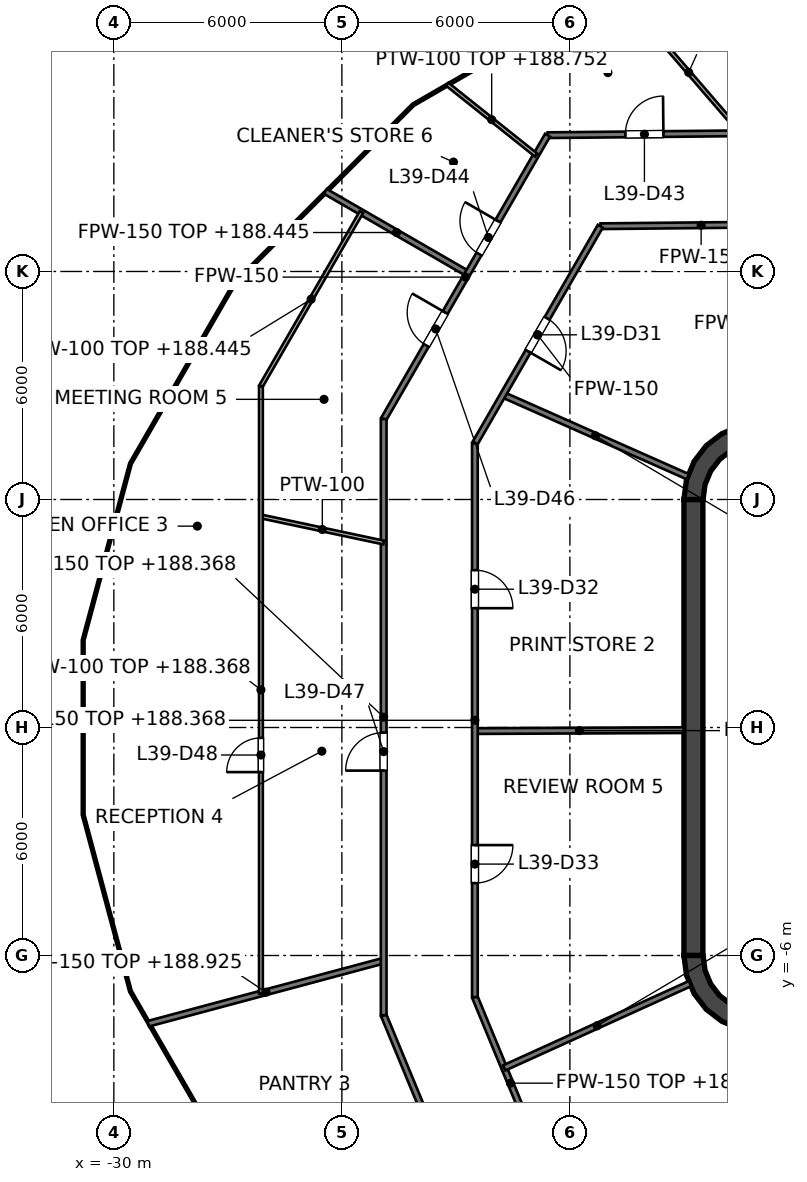
"""IFC4 building model, lengths in metres.
Left out: names, types, materials, properties, quantities, classifications, styles, units other than length and angle.
Written with IfcOpenShell. Run it as: python <this file> out.ifc"""

import sys

from ifc_helpers import new_model, si_unit, direction, frame, frame_2d, origin, place, context, subcontext, project, spatial, polyline, rectangle, outline, extrude, element, fill, save


model = new_model("IFC4")
c1 = context("Model", 3, precision=1e-05, world=origin(), true_north=direction((0.0, 1.0)))
c2 = subcontext(c1, "Body", "Model", "MODEL_VIEW")
j1 = project(units=[si_unit("LENGTHUNIT", "METRE"), si_unit("PLANEANGLEUNIT", "RADIAN")], contexts=[c1])
p1 = place(None, origin())
s1 = spatial("IfcSite", under=j1, at=p1, CompositionType="ELEMENT")
p2 = place(p1, origin())
s2 = spatial("IfcBuilding", under=s1, at=p2, CompositionType="ELEMENT")
p3 = place(p2, frame((0.0, 0.0, 185.6)))
s3 = spatial("IfcBuildingStorey", under=s2, at=p3, CompositionType="ELEMENT", Elevation=185.6)
p4 = place(p3, frame((-14.75, -6.0, 0.0), z_axis=(0.0, 0.0, 1.0), x_axis=(0.0, 1.0, 0.0)))
e1 = element("IfcWall", 1, at=p4, inside=s3, PredefinedType="SHEAR", context=c2, shape_type="SweptSolid", body=[
    extrude(rectangle(XDim=12.0, YDim=0.5, at=frame_2d((6.0, 0.0))), origin(), (0.0, 0.0, 1.0), 4.0),
])
p5 = place(p3, origin())
e2 = element("IfcWall", 2, at=p5, inside=s3, PredefinedType="SHEAR", context=c2, shape_type="SweptSolid", body=[
    extrude(outline(polyline([(-15.0, 6.0), (-14.496, 6.0), (-14.445, 6.387), (-14.295, 6.748), (-14.058, 7.058), (-13.748, 7.295), (-13.387, 7.445), (-13.0, 7.496), (-13.0, 8.0), (-13.518, 7.932), (-14.0, 7.732), (-14.414, 7.414), (-14.732, 7.0), (-14.932, 6.518), (-15.0, 6.0)])), origin(), (0.0, 0.0, 1.0), 4.0),
])
e3 = element("IfcWall", 3, at=p5, inside=s3, PredefinedType="SHEAR", context=c2, shape_type="SweptSolid", body=[
    extrude(outline(polyline([(-13.0, -8.0), (-13.0, -7.496), (-13.387, -7.445), (-13.748, -7.295), (-14.058, -7.058), (-14.295, -6.748), (-14.445, -6.387), (-14.496, -6.0), (-15.0, -6.0), (-14.932, -6.518), (-14.732, -7.0), (-14.414, -7.414), (-14.0, -7.732), (-13.518, -7.932), (-13.0, -8.0)])), origin(), (0.0, 0.0, 1.0), 4.0),
])
e4 = element("IfcWall", 4, at=p5, inside=s3, PredefinedType="SOLIDWALL", context=c2, shape_type="SweptSolid", body=[
    extrude(outline(polyline([(-12.0, -5.925), (-12.0, -5.675), (-14.25, -5.675), (-14.25, -3.025), (-12.0, -3.025), (-12.0, -2.775), (-14.25, -2.775), (-14.25, -0.125), (-12.0, -0.125), (-12.0, 0.125), (-14.25, 0.125), (-14.25, 2.775), (-12.0, 2.775), (-12.0, 3.025), (-14.25, 3.025), (-14.25, 5.675), (-12.0, 5.675), (-12.0, 5.925), (-14.25, 5.925), (-14.5, 5.925), (-14.5, 5.675), (-14.5, 3.025), (-14.5, 2.775), (-14.5, 0.125), (-14.5, -0.125), (-14.5, -2.775), (-14.5, -3.025), (-14.5, -5.675), (-14.5, -5.925), (-14.25, -5.925), (-12.0, -5.925)])), origin(), (0.0, 0.0, 1.0), 3.85),
])
p6 = place(p3, frame((-22.9, -7.572, 0.0), z_axis=(0.0, 0.0, 1.0), x_axis=(0.382367581622, -0.924010298928, 0.0)))
e5 = element("IfcWall", 5, at=p6, inside=s3, PredefinedType="PARTITIONING", context=c2, shape_type="SweptSolid", body=[
    extrude(rectangle(XDim=6.374, YDim=0.15, at=frame_2d((3.187, 0.0))), origin(), (0.0, 0.0, 1.0), 2.777),
])
p7 = place(p6, frame((2.6, 0.0, 0.0)))
e6 = element("IfcOpeningElement", 6, at=p7, cuts=e5, PredefinedType="OPENING", context=c2, shape_type="SweptSolid", body=[
    extrude(rectangle(XDim=1.0, YDim=2.1, at=frame_2d((0.5, 1.05))), frame((0.0, 0.075, 0.0), z_axis=(0.0, -1.0, 0.0), x_axis=(1.0, 0.0, 0.0)), (0.0, 0.0, 1.0), 0.15),
])
p8 = place(p3, frame((-20.5, -7.095, 0.0), z_axis=(0.0, 0.0, 1.0), x_axis=(0.382364990163, -0.924011371303, 0.0)))
e7 = element("IfcWall", 7, at=p8, inside=s3, PredefinedType="PARTITIONING", context=c2, shape_type="SweptSolid", body=[
    extrude(rectangle(XDim=4.902, YDim=0.15, at=frame_2d((2.451, 0.0))), origin(), (0.0, 0.0, 1.0), 2.845),
])
p9 = place(p3, frame((-24.433, 14.106, 0.0), z_axis=(0.0, 0.0, 1.0), x_axis=(0.866048255864, -0.499960416948, 0.0)))
e8 = element("IfcWall", 8, at=p9, inside=s3, PredefinedType="PARTITIONING", context=c2, shape_type="SweptSolid", body=[
    extrude(rectangle(XDim=4.322, YDim=0.15, at=frame_2d((2.161, 0.0))), origin(), (0.0, 0.0, 1.0), 2.845),
])
p10 = place(p3, frame((-19.76, 8.755, 0.0), z_axis=(0.0, 0.0, 1.0), x_axis=(0.91424834547, -0.405154245695, 0.0)))
e9 = element("IfcWall", 9, at=p10, inside=s3, PredefinedType="PARTITIONING", context=c2, shape_type="SweptSolid", body=[
    extrude(rectangle(XDim=5.318, YDim=0.15, at=frame_2d((2.659, 0.0))), origin(), (0.0, 0.0, 1.0), 2.845),
])
p11 = place(p3, frame((-20.5, -0.094, 0.0), z_axis=(0.0, 0.0, 1.0), x_axis=(0.999990148138, 0.004438876723, 0.0)))
e10 = element("IfcWall", 10, at=p11, inside=s3, PredefinedType="PARTITIONING", context=c2, shape_type="SweptSolid", body=[
    extrude(rectangle(XDim=5.5, YDim=0.15, at=frame_2d((2.75, 0.0))), origin(), (0.0, 0.0, 1.0), 2.768),
])
p12 = place(p3, frame((-17.194, 13.191, 0.0), z_axis=(0.0, 0.0, 1.0), x_axis=(0.999950853109, 0.009914200296, 0.0)))
e11 = element("IfcWall", 11, at=p12, inside=s3, PredefinedType="PARTITIONING", context=c2, shape_type="SweptSolid", body=[
    extrude(rectangle(XDim=5.294, YDim=0.15, at=frame_2d((2.647, 0.0))), origin(), (0.0, 0.0, 1.0), 2.777),
])
p13 = place(p3, frame((-18.587, 15.586, 0.0), z_axis=(0.0, 0.0, 1.0), x_axis=(0.999951300332, 0.009868989991, 0.0)))
e12 = element("IfcWall", 12, at=p13, inside=s3, PredefinedType="PARTITIONING", context=c2, shape_type="SweptSolid", body=[
    extrude(rectangle(XDim=33.669, YDim=0.15, at=frame_2d((16.834, 0.0))), origin(), (0.0, 0.0, 1.0), 2.768),
])
p14 = place(p13, frame((27.749, 0.0, 0.0)))
e13 = element("IfcOpeningElement", 13, at=p14, cuts=e12, PredefinedType="OPENING", context=c2, shape_type="SweptSolid", body=[
    extrude(rectangle(XDim=1.0, YDim=2.1, at=frame_2d((0.5, 1.05))), frame((0.0, 0.075, 0.0), z_axis=(0.0, -1.0, 0.0), x_axis=(1.0, 0.0, 0.0)), (0.0, 0.0, 1.0), 0.15),
])
p15 = place(p13, frame((21.111, 0.0, 0.0)))
e14 = element("IfcOpeningElement", 14, at=p15, cuts=e12, PredefinedType="OPENING", context=c2, shape_type="SweptSolid", body=[
    extrude(rectangle(XDim=1.0, YDim=2.1, at=frame_2d((0.5, 1.05))), frame((0.0, 0.075, 0.0), z_axis=(0.0, -1.0, 0.0), x_axis=(1.0, 0.0, 0.0)), (0.0, 0.0, 1.0), 0.15),
])
p16 = place(p13, frame((12.139, 0.0, 0.0)))
e15 = element("IfcOpeningElement", 15, at=p16, cuts=e12, PredefinedType="OPENING", context=c2, shape_type="SweptSolid", body=[
    extrude(rectangle(XDim=1.0, YDim=2.1, at=frame_2d((0.5, 1.05))), frame((0.0, 0.075, 0.0), z_axis=(0.0, -1.0, 0.0), x_axis=(1.0, 0.0, 0.0)), (0.0, 0.0, 1.0), 0.15),
])
p17 = place(p13, frame((2.048, 0.0, 0.0)))
e16 = element("IfcOpeningElement", 16, at=p17, cuts=e12, PredefinedType="OPENING", context=c2, shape_type="SweptSolid", body=[
    extrude(rectangle(XDim=1.0, YDim=2.1, at=frame_2d((0.5, 1.05))), frame((0.0, 0.075, 0.0), z_axis=(0.0, -1.0, 0.0), x_axis=(1.0, 0.0, 0.0)), (0.0, 0.0, 1.0), 0.15),
])
p18 = place(p3, frame((-29.094, -7.796, 0.0), z_axis=(0.0, 0.0, 1.0), x_axis=(0.965917630497, 0.258849630277, 0.0)))
e17 = element("IfcWall", 17, at=p18, inside=s3, PredefinedType="PARTITIONING", context=c2, shape_type="SweptSolid", body=[
    extrude(rectangle(XDim=6.413, YDim=0.15, at=frame_2d((3.206, 0.0))), origin(), (0.0, 0.0, 1.0), 3.325),
])
p19 = place(p3, frame((-19.728, -8.958, 0.0), z_axis=(0.0, 0.0, 1.0), x_axis=(0.910629511797, 0.413223779863, 0.0)))
e18 = element("IfcWall", 18, at=p19, inside=s3, PredefinedType="PARTITIONING", context=c2, shape_type="SweptSolid", body=[
    extrude(rectangle(XDim=5.368, YDim=0.15, at=frame_2d((2.684, 0.0))), origin(), (0.0, 0.0, 1.0), 3.7),
])
p20 = place(p3, frame((-20.5, 7.474, 0.0), z_axis=(0.0, 0.0, 1.0), x_axis=(0.499957196903, 0.866050114754, 0.0)))
e19 = element("IfcWall", 19, at=p20, inside=s3, PredefinedType="PARTITIONING", context=c2, shape_type="SweptSolid", body=[
    extrude(rectangle(XDim=6.602, YDim=0.15, at=frame_2d((3.301, 0.0))), origin(), (0.0, 0.0, 1.0), 2.777),
])
p21 = place(p20, frame((2.802, 0.0, 0.0)))
e20 = element("IfcOpeningElement", 20, at=p21, cuts=e19, PredefinedType="OPENING", context=c2, shape_type="SweptSolid", body=[
    extrude(rectangle(XDim=1.0, YDim=2.1, at=frame_2d((0.5, 1.05))), frame((0.0, 0.075, 0.0), z_axis=(0.0, -1.0, 0.0), x_axis=(1.0, 0.0, 0.0)), (0.0, 0.0, 1.0), 0.15),
])
p22 = place(p3, frame((-22.9, 8.117, 0.0), z_axis=(0.0, 0.0, 1.0), x_axis=(0.499950307977, 0.866054091587, 0.0)))
e21 = element("IfcWall", 21, at=p22, inside=s3, PredefinedType="PARTITIONING", context=c2, shape_type="SweptSolid", body=[
    extrude(rectangle(XDim=8.626, YDim=0.15, at=frame_2d((4.313, 0.0))), origin(), (0.0, 0.0, 1.0), 2.777),
])
p23 = place(p22, frame((5.015, 0.0, 0.0)))
e22 = element("IfcOpeningElement", 22, at=p23, cuts=e21, PredefinedType="OPENING", context=c2, shape_type="SweptSolid", body=[
    extrude(rectangle(XDim=1.0, YDim=2.1, at=frame_2d((0.5, 1.05))), frame((0.0, 0.075, 0.0), z_axis=(0.0, -1.0, 0.0), x_axis=(1.0, 0.0, 0.0)), (0.0, 0.0, 1.0), 0.15),
])
p24 = place(p22, frame((2.237, 0.0, 0.0)))
e23 = element("IfcOpeningElement", 23, at=p24, cuts=e21, PredefinedType="OPENING", context=c2, shape_type="SweptSolid", body=[
    extrude(rectangle(XDim=1.0, YDim=2.1, at=frame_2d((0.5, 1.05))), frame((0.0, 0.075, 0.0), z_axis=(0.0, -1.0, 0.0), x_axis=(1.0, 0.0, 0.0)), (0.0, 0.0, 1.0), 0.15),
])
p25 = place(p3, frame((-20.5, -7.095, 0.0), z_axis=(0.0, 0.0, 1.0), x_axis=(0.0, 1.0, 0.0)))
e24 = element("IfcWall", 24, at=p25, inside=s3, PredefinedType="PARTITIONING", context=c2, shape_type="SweptSolid", body=[
    extrude(rectangle(XDim=14.569, YDim=0.15, at=frame_2d((7.285, 0.0))), origin(), (0.0, 0.0, 1.0), 2.768),
])
p26 = place(p25, frame((10.234, 0.0, 0.0)))
e25 = element("IfcOpeningElement", 25, at=p26, cuts=e24, PredefinedType="OPENING", context=c2, shape_type="SweptSolid", body=[
    extrude(rectangle(XDim=1.0, YDim=2.1, at=frame_2d((0.5, 1.05))), frame((0.0, 0.075, 0.0), z_axis=(0.0, -1.0, 0.0), x_axis=(1.0, 0.0, 0.0)), (0.0, 0.0, 1.0), 0.15),
])
p27 = place(p25, frame((3.0, 0.0, 0.0)))
e26 = element("IfcOpeningElement", 26, at=p27, cuts=e24, PredefinedType="OPENING", context=c2, shape_type="SweptSolid", body=[
    extrude(rectangle(XDim=1.0, YDim=2.1, at=frame_2d((0.5, 1.05))), frame((0.0, 0.075, 0.0), z_axis=(0.0, -1.0, 0.0), x_axis=(1.0, 0.0, 0.0)), (0.0, 0.0, 1.0), 0.15),
])
p28 = place(p3, frame((-22.9, -7.572, 0.0), z_axis=(0.0, 0.0, 1.0), x_axis=(0.0, 1.0, 0.0)))
e27 = element("IfcWall", 27, at=p28, inside=s3, PredefinedType="PARTITIONING", context=c2, shape_type="SweptSolid", body=[
    extrude(rectangle(XDim=15.689, YDim=0.15, at=frame_2d((7.844, 0.0))), origin(), (0.0, 0.0, 1.0), 2.768),
])
p29 = place(p28, frame((6.438, 0.0, 0.0)))
e28 = element("IfcOpeningElement", 28, at=p29, cuts=e27, PredefinedType="OPENING", context=c2, shape_type="SweptSolid", body=[
    extrude(rectangle(XDim=1.0, YDim=2.1, at=frame_2d((0.5, 1.05))), frame((0.0, 0.075, 0.0), z_axis=(0.0, -1.0, 0.0), x_axis=(1.0, 0.0, 0.0)), (0.0, 0.0, 1.0), 0.15),
])
p30 = place(p3, frame((-16.257, 18.841, 0.0), z_axis=(0.0, 0.0, 1.0), x_axis=(0.653325359449, -0.757077258079, 0.0)))
e29 = element("IfcWall", 29, at=p30, inside=s3, PredefinedType="PARTITIONING", context=c2, shape_type="SweptSolid", body=[
    extrude(rectangle(XDim=4.231, YDim=0.1, at=frame_2d((2.115, 0.0))), origin(), (0.0, 0.0, 1.0), 3.7),
])
p31 = place(p3, frame((-21.228, 16.928, 0.0), z_axis=(0.0, 0.0, 1.0), x_axis=(0.781894831851, -0.623410355966, 0.0)))
e30 = element("IfcWall", 30, at=p31, inside=s3, PredefinedType="PARTITIONING", context=c2, shape_type="SweptSolid", body=[
    extrude(rectangle(XDim=2.992, YDim=0.1, at=frame_2d((1.496, 0.0))), origin(), (0.0, 0.0, 1.0), 3.152),
])
p32 = place(p3, frame((-26.13, 5.554, 0.0), z_axis=(0.0, 0.0, 1.0), x_axis=(0.978119374933, -0.208044438478, 0.0)))
e31 = element("IfcWall", 31, at=p32, inside=s3, PredefinedType="PARTITIONING", context=c2, shape_type="SweptSolid", body=[
    extrude(rectangle(XDim=3.302, YDim=0.1, at=frame_2d((1.651, 0.0))), origin(), (0.0, 0.0, 1.0), 3.7),
])
p33 = place(p3, frame((-26.13, 8.983, 0.0), z_axis=(0.0, 0.0, 1.0), x_axis=(0.500063643593, 0.865988656021, 0.0)))
e32 = element("IfcWall", 32, at=p33, inside=s3, PredefinedType="PARTITIONING", context=c2, shape_type="SweptSolid", body=[
    extrude(rectangle(XDim=5.285, YDim=0.1, at=frame_2d((2.643, 0.0))), origin(), (0.0, 0.0, 1.0), 2.845),
])
p34 = place(p3, frame((-26.13, -7.002, 0.0), z_axis=(0.0, 0.0, 1.0), x_axis=(0.0, 1.0, 0.0)))
e33 = element("IfcWall", 33, at=p34, inside=s3, PredefinedType="PARTITIONING", context=c2, shape_type="SweptSolid", body=[
    extrude(rectangle(XDim=15.985, YDim=0.1, at=frame_2d((7.992, 0.0))), origin(), (0.0, 0.0, 1.0), 2.768),
])
p35 = place(p34, frame((5.828, 0.0, 0.0)))
e34 = element("IfcOpeningElement", 34, at=p35, cuts=e33, PredefinedType="OPENING", context=c2, shape_type="SweptSolid", body=[
    extrude(rectangle(XDim=0.9, YDim=2.1, at=frame_2d((0.45, 1.05))), frame((0.0, 0.05, 0.0), z_axis=(0.0, -1.0, 0.0), x_axis=(1.0, 0.0, 0.0)), (0.0, 0.0, 1.0), 0.1),
])
p36 = place(p21, origin())
e35 = element("IfcDoor", 35, at=p36, inside=s3, OperationType="SINGLE_SWING_LEFT", PredefinedType="DOOR", context=c2, shape_type="SweptSolid", body=[
    extrude(rectangle(XDim=1.0, YDim=2.1, at=frame_2d((0.5, 1.05))), frame((0.0, 0.025, 0.0), z_axis=(0.0, -1.0, 0.0), x_axis=(1.0, 0.0, 0.0)), (0.0, 0.0, 1.0), 0.05),
])
fill(e20, e35)
p37 = place(p26, origin())
e36 = element("IfcDoor", 36, at=p37, inside=s3, OperationType="SINGLE_SWING_LEFT", PredefinedType="DOOR", context=c2, shape_type="SweptSolid", body=[
    extrude(rectangle(XDim=1.0, YDim=2.1, at=frame_2d((0.5, 1.05))), frame((0.0, 0.025, 0.0), z_axis=(0.0, -1.0, 0.0), x_axis=(1.0, 0.0, 0.0)), (0.0, 0.0, 1.0), 0.05),
])
fill(e25, e36)
p38 = place(p27, origin())
e37 = element("IfcDoor", 37, at=p38, inside=s3, OperationType="SINGLE_SWING_RIGHT", PredefinedType="DOOR", context=c2, shape_type="SweptSolid", body=[
    extrude(rectangle(XDim=1.0, YDim=2.1, at=frame_2d((0.5, 1.05))), frame((0.0, 0.025, 0.0), z_axis=(0.0, -1.0, 0.0), x_axis=(1.0, 0.0, 0.0)), (0.0, 0.0, 1.0), 0.05),
])
fill(e26, e37)
p39 = place(p17, origin())
e38 = element("IfcDoor", 38, at=p39, inside=s3, OperationType="SINGLE_SWING_RIGHT", PredefinedType="DOOR", context=c2, shape_type="SweptSolid", body=[
    extrude(rectangle(XDim=1.0, YDim=2.1, at=frame_2d((0.5, 1.05))), frame((0.0, 0.025, 0.0), z_axis=(0.0, -1.0, 0.0), x_axis=(1.0, 0.0, 0.0)), (0.0, 0.0, 1.0), 0.05),
])
fill(e16, e38)
p40 = place(p23, origin())
e39 = element("IfcDoor", 39, at=p40, inside=s3, OperationType="SINGLE_SWING_RIGHT", PredefinedType="DOOR", context=c2, shape_type="SweptSolid", body=[
    extrude(rectangle(XDim=1.0, YDim=2.1, at=frame_2d((0.5, 1.05))), frame((0.0, 0.025, 0.0), z_axis=(0.0, -1.0, 0.0), x_axis=(1.0, 0.0, 0.0)), (0.0, 0.0, 1.0), 0.05),
])
fill(e22, e39)
p41 = place(p24, origin())
e40 = element("IfcDoor", 40, at=p41, inside=s3, OperationType="SINGLE_SWING_RIGHT", PredefinedType="DOOR", context=c2, shape_type="SweptSolid", body=[
    extrude(rectangle(XDim=1.0, YDim=2.1, at=frame_2d((0.5, 1.05))), frame((0.0, 0.025, 0.0), z_axis=(0.0, -1.0, 0.0), x_axis=(1.0, 0.0, 0.0)), (0.0, 0.0, 1.0), 0.05),
])
fill(e23, e40)
p42 = place(p29, origin())
e41 = element("IfcDoor", 41, at=p42, inside=s3, OperationType="SINGLE_SWING_LEFT", PredefinedType="DOOR", context=c2, shape_type="SweptSolid", body=[
    extrude(rectangle(XDim=1.0, YDim=2.1, at=frame_2d((0.5, 1.05))), frame((0.0, 0.025, 0.0), z_axis=(0.0, -1.0, 0.0), x_axis=(1.0, 0.0, 0.0)), (0.0, 0.0, 1.0), 0.05),
])
fill(e28, e41)
p43 = place(p35, origin())
e42 = element("IfcDoor", 42, at=p43, inside=s3, OperationType="SINGLE_SWING_LEFT", PredefinedType="DOOR", context=c2, shape_type="SweptSolid", body=[
    extrude(rectangle(XDim=0.9, YDim=2.1, at=frame_2d((0.45, 1.05))), frame((0.0, 0.025, 0.0), z_axis=(0.0, -1.0, 0.0), x_axis=(1.0, 0.0, 0.0)), (0.0, 0.0, 1.0), 0.05),
])
fill(e34, e42)
save(model, sys.argv[1])
